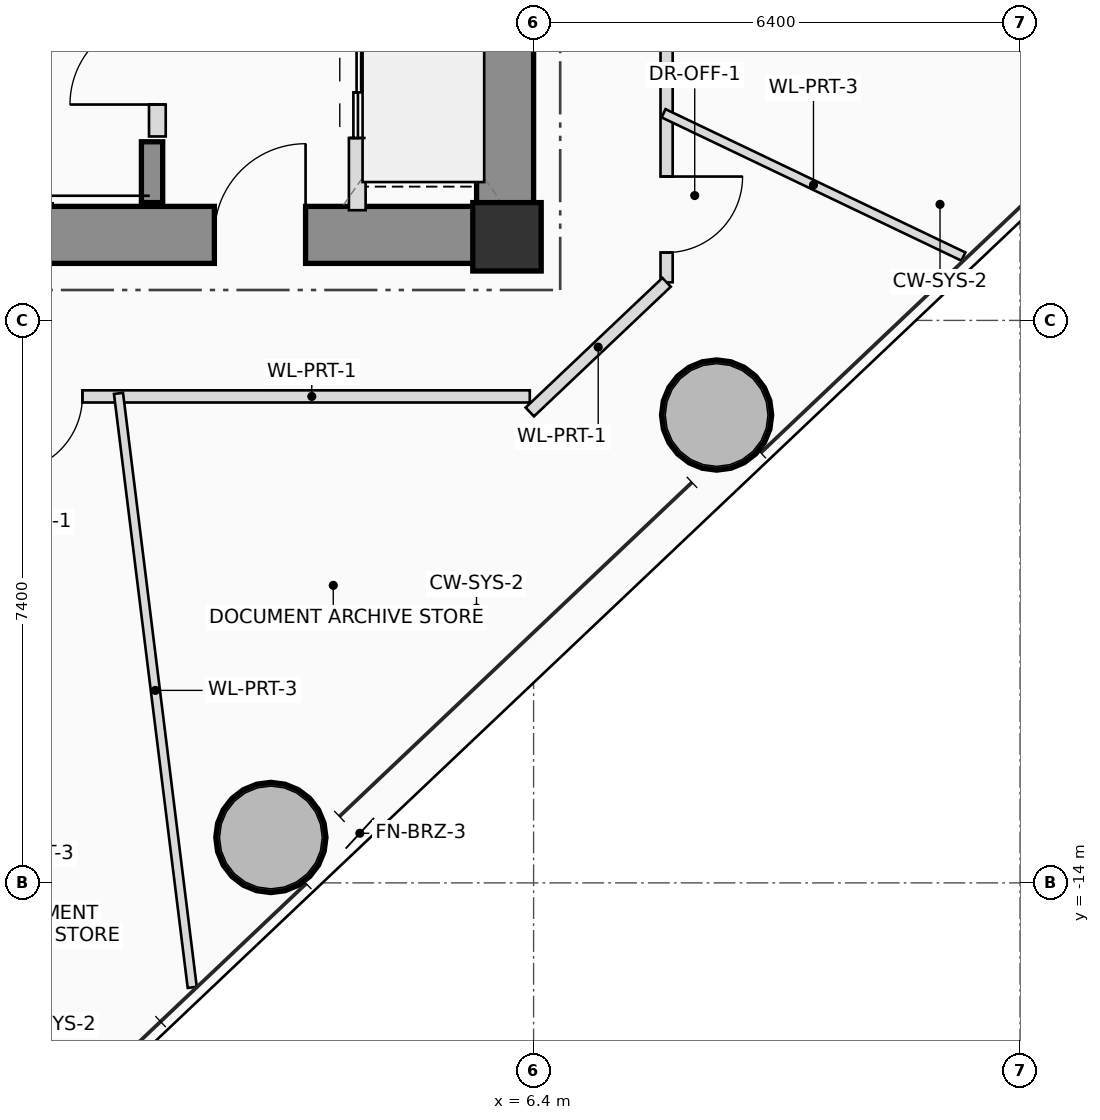
"""IFC4 building model, lengths in metres.
Left out: names, types, materials, properties, quantities, classifications, styles, units other than length and angle.
Written with IfcOpenShell. Run it as: python <this file> out.ifc"""

import sys

from ifc_helpers import new_model, si_unit, direction, frame, frame_2d, origin, origin_2d, place, context, subcontext, project, spatial, rectangle, hollow_circle, extrude, source, transform, mapped, element, fill, save


model = new_model("IFC4")
c1 = context("Model", 3, precision=1e-05, world=origin(), true_north=direction((0.0, 1.0)))
c2 = subcontext(c1, "Body", "Model", "MODEL_VIEW")
j1 = project(units=[si_unit("LENGTHUNIT", "METRE"), si_unit("PLANEANGLEUNIT", "RADIAN")], contexts=[c1])
p1 = place(None, origin())
s1 = spatial("IfcSite", under=j1, at=p1, CompositionType="ELEMENT")
p2 = place(p1, origin())
s2 = spatial("IfcBuilding", under=s1, at=p2, CompositionType="ELEMENT")
p3 = place(p2, frame((0.0, 0.0, 112.4)))
s3 = spatial("IfcBuildingStorey", under=s2, at=p3, CompositionType="ELEMENT", Elevation=112.4)
m1 = source(origin(), c2, "Body", "SweptSolid", [
    extrude(rectangle(XDim=0.9, YDim=0.9, at=origin_2d()), origin(), (0.0, 0.0, 1.0), 3.75),
])
p4 = place(p3, frame((6.05, -5.5, 0.0), z_axis=(0.0, 0.0, 1.0), x_axis=(1.0, 0.0, 0.0)))
e1 = element("IfcColumn", 1, at=p4, inside=s3, PredefinedType="COLUMN", context=c2, shape_type="MappedRepresentation", body=[
    mapped(m1, transform((0.0, 0.0, 0.0), scale=1.0)),
])
p5 = place(p3, frame((-6.4, -5.475, 0.0), z_axis=(0.0, 0.0, 1.0), x_axis=(1.0, 0.0, 0.0)))
e2 = element("IfcWall", 2, at=p5, inside=s3, PredefinedType="SHEAR", context=c2, shape_type="SweptSolid", body=[
    extrude(rectangle(XDim=12.8, YDim=0.75, at=frame_2d((6.4, 0.0))), origin(), (0.0, 0.0, 1.0), 3.75),
])
p6 = place(p5, frame((8.6, 0.0, 0.0)))
e3 = element("IfcOpeningElement", 3, at=p6, cuts=e2, PredefinedType="OPENING", context=c2, shape_type="SweptSolid", body=[
    extrude(rectangle(XDim=1.2, YDim=2.2, at=frame_2d((0.6, 1.1))), frame((0.0, 0.385, 0.0), z_axis=(0.0, -1.0, 0.0), x_axis=(1.0, 0.0, 0.0)), (0.0, 0.0, 1.0), 0.77),
])
p7 = place(p3, frame((6.025, -5.1, 0.0), z_axis=(0.0, 0.0, 1.0), x_axis=(0.0, 1.0, 0.0)))
e4 = element("IfcWall", 4, at=p7, inside=s3, PredefinedType="SHEAR", context=c2, shape_type="SweptSolid", body=[
    extrude(rectangle(XDim=10.2, YDim=0.75, at=frame_2d((5.1, 0.0))), origin(), (0.0, 0.0, 1.0), 3.75),
])
p8 = place(p3, frame((1.38, -5.05, 0.0), z_axis=(0.0, 0.0, 1.0), x_axis=(0.0, 1.0, 0.0)))
e5 = element("IfcWall", 5, at=p8, inside=s3, PredefinedType="SHEAR", context=c2, shape_type="SweptSolid", body=[
    extrude(rectangle(XDim=0.8, YDim=0.28, at=frame_2d((0.4, 0.0))), origin(), (0.0, 0.0, 1.0), 3.75),
])
m2 = source(origin(), c2, "Body", "SweptSolid", [
    extrude(hollow_circle(Radius=0.725, WallThickness=0.05, at=origin_2d()), origin(), (0.0, 0.0, 1.0), 3.75),
])
for number, where, z_axis, x_axis in (
    (6, (2.943, -13.402, 0.0), (0.0, 0.0, 1.0), (1.0, 0.0, 0.0)),
    (7, (8.808, -7.845, 0.0), (0.0, 0.0, 1.0), (1.0, 0.0, 0.0)),
):
    element("IfcColumn", number, at=place(p3, frame(where, z_axis=z_axis, x_axis=x_axis)), inside=s3, PredefinedType="COLUMN", context=c2, shape_type="MappedRepresentation", body=[
        mapped(m2, transform((0.0, 0.0, 0.0), scale=1.0)),
    ])
p9 = place(p3, frame((1.45, -4.18, 0.0), z_axis=(0.0, 0.0, 1.0), x_axis=(0.0, 1.0, 0.0)))
e8 = element("IfcWall", 8, at=p9, inside=s3, PredefinedType="PLUMBINGWALL", context=c2, shape_type="SweptSolid", body=[
    extrude(rectangle(XDim=1.98, YDim=0.22, at=frame_2d((0.99, 0.0))), origin(), (0.0, 0.0, 1.0), 3.545),
])
p10 = place(p9, frame((0.42, 0.0, 0.0)))
e9 = element("IfcOpeningElement", 9, at=p10, cuts=e8, PredefinedType="OPENING", context=c2, shape_type="SweptSolid", body=[
    extrude(rectangle(XDim=1.15, YDim=2.15, at=frame_2d((0.575, 1.075))), frame((0.0, 0.12, 0.0), z_axis=(0.0, -1.0, 0.0), x_axis=(1.0, 0.0, 0.0)), (0.0, 0.0, 1.0), 0.24),
])
p11 = place(p3, frame((4.08, -5.15, 0.0), z_axis=(0.0, 0.0, 1.0), x_axis=(0.0, 1.0, 0.0)))
e10 = element("IfcWall", 10, at=p11, inside=s3, PredefinedType="PLUMBINGWALL", context=c2, shape_type="SweptSolid", body=[
    extrude(rectangle(XDim=2.95, YDim=0.22, at=frame_2d((1.475, 0.0))), origin(), (0.0, 0.0, 1.0), 3.545),
])
p12 = place(p11, frame((0.95, 0.0, 0.0)))
e11 = element("IfcOpeningElement", 11, at=p12, cuts=e10, PredefinedType="OPENING", context=c2, shape_type="SweptSolid", body=[
    extrude(rectangle(XDim=1.2, YDim=2.25, at=frame_2d((0.6, 1.125))), frame((0.0, 0.12, 0.0), z_axis=(0.0, -1.0, 0.0), x_axis=(1.0, 0.0, 0.0)), (0.0, 0.0, 1.0), 0.24),
])
p13 = place(p3, frame((8.15, -0.02, 0.0), z_axis=(0.0, 0.0, 1.0), x_axis=(0.0, -1.0, 0.0)))
e12 = element("IfcWall", 12, at=p13, inside=s3, PredefinedType="PARTITIONING", context=c2, shape_type="SweptSolid", body=[
    extrude(rectangle(XDim=6.079, YDim=0.16, at=frame_2d((3.04, 0.0))), origin(), (0.0, 0.0, 1.0), 2.85),
])
p14 = place(p13, frame((4.688, 0.0, 0.0)))
e13 = element("IfcOpeningElement", 13, at=p14, cuts=e12, PredefinedType="OPENING", context=c2, shape_type="SweptSolid", body=[
    extrude(rectangle(XDim=1.0, YDim=2.25, at=frame_2d((0.5, 1.125))), frame((0.0, 0.09, 0.0), z_axis=(0.0, -1.0, 0.0), x_axis=(1.0, 0.0, 0.0)), (0.0, 0.0, 1.0), 0.18),
])
p15 = place(p3, frame((8.15, -6.099, 0.0), z_axis=(0.0, 0.0, 1.0), x_axis=(-0.725854359245, -0.687848420196, 0.0)))
e14 = element("IfcWall", 14, at=p15, inside=s3, PredefinedType="PARTITIONING", context=c2, shape_type="SweptSolid", body=[
    extrude(rectangle(XDim=2.479, YDim=0.16, at=frame_2d((1.24, 0.0))), origin(), (0.0, 0.0, 1.0), 2.85),
])
p16 = place(p3, frame((6.35, -7.6, 0.0), z_axis=(0.0, 0.0, 1.0), x_axis=(-1.0, 0.0, 0.0)))
e15 = element("IfcWall", 15, at=p16, inside=s3, PredefinedType="PARTITIONING", context=c2, shape_type="SweptSolid", body=[
    extrude(rectangle(XDim=12.7, YDim=0.16, at=frame_2d((6.35, 0.0))), origin(), (0.0, 0.0, 1.0), 2.85),
])
p17 = place(p16, frame((5.887, 0.0, 0.0)))
e16 = element("IfcOpeningElement", 16, at=p17, cuts=e15, PredefinedType="OPENING", context=c2, shape_type="SweptSolid", body=[
    extrude(rectangle(XDim=1.0, YDim=2.25, at=frame_2d((0.5, 1.125))), frame((0.0, 0.09, 0.0), z_axis=(0.0, -1.0, 0.0), x_axis=(1.0, 0.0, 0.0)), (0.0, 0.0, 1.0), 0.18),
])
p18 = place(p3, frame((0.939, -7.56, 0.0), z_axis=(0.0, 0.0, 1.0), x_axis=(0.12317613507, -0.992384824425, 0.0)))
e17 = element("IfcWall", 17, at=p18, inside=s3, PredefinedType="PARTITIONING", context=c2, shape_type="SweptSolid", body=[
    extrude(rectangle(XDim=7.875, YDim=0.12, at=frame_2d((3.938, 0.0))), origin(), (0.0, 0.0, 1.0), 3.01),
])
p19 = place(p3, frame((8.11, -3.875, 0.0), z_axis=(0.0, 0.0, 1.0), x_axis=(0.902280645173, -0.431149205433, 0.0)))
e18 = element("IfcWall", 18, at=p19, inside=s3, PredefinedType="PARTITIONING", context=c2, shape_type="SweptSolid", body=[
    extrude(rectangle(XDim=4.372, YDim=0.12, at=frame_2d((2.186, 0.0))), origin(), (0.0, 0.0, 1.0), 2.85),
])
p20 = place(p6, origin())
e19 = element("IfcDoor", 19, at=p20, inside=s3, OperationType="SINGLE_SWING_RIGHT", PredefinedType="DOOR", context=c2, shape_type="SweptSolid", body=[
    extrude(rectangle(XDim=1.2, YDim=2.2, at=frame_2d((0.6, 1.1))), frame((0.0, 0.025, 0.0), z_axis=(0.0, -1.0, 0.0), x_axis=(1.0, 0.0, 0.0)), (0.0, 0.0, 1.0), 0.05),
])
fill(e3, e19)
p21 = place(p10, origin())
e20 = element("IfcDoor", 20, at=p21, inside=s3, OperationType="SINGLE_SWING_LEFT", PredefinedType="DOOR", context=c2, shape_type="SweptSolid", body=[
    extrude(rectangle(XDim=1.15, YDim=2.15, at=frame_2d((0.575, 1.075))), frame((0.0, 0.025, 0.0), z_axis=(0.0, -1.0, 0.0), x_axis=(1.0, 0.0, 0.0)), (0.0, 0.0, 1.0), 0.05),
])
fill(e9, e20)
p22 = place(p12, origin())
e21 = element("IfcDoor", 21, at=p22, inside=s3, OperationType="DOUBLE_DOOR_SLIDING", PredefinedType="DOOR", context=c2, shape_type="SweptSolid", body=[
    extrude(rectangle(XDim=1.2, YDim=2.25, at=frame_2d((0.6, 1.125))), frame((0.0, 0.025, 0.0), z_axis=(0.0, -1.0, 0.0), x_axis=(1.0, 0.0, 0.0)), (0.0, 0.0, 1.0), 0.05),
])
fill(e11, e21)
p23 = place(p14, origin())
e22 = element("IfcDoor", 22, at=p23, inside=s3, OperationType="SINGLE_SWING_LEFT", PredefinedType="DOOR", context=c2, shape_type="SweptSolid", body=[
    extrude(rectangle(XDim=1.0, YDim=2.25, at=frame_2d((0.5, 1.125))), frame((0.0, 0.025, 0.0), z_axis=(0.0, -1.0, 0.0), x_axis=(1.0, 0.0, 0.0)), (0.0, 0.0, 1.0), 0.05),
])
fill(e13, e22)
p24 = place(p17, origin())
e23 = element("IfcDoor", 23, at=p24, inside=s3, OperationType="SINGLE_SWING_RIGHT", PredefinedType="DOOR", context=c2, shape_type="SweptSolid", body=[
    extrude(rectangle(XDim=1.0, YDim=2.25, at=frame_2d((0.5, 1.125))), frame((0.0, 0.025, 0.0), z_axis=(0.0, -1.0, 0.0), x_axis=(1.0, 0.0, 0.0)), (0.0, 0.0, 1.0), 0.05),
])
fill(e16, e23)
save(model, sys.argv[1])
